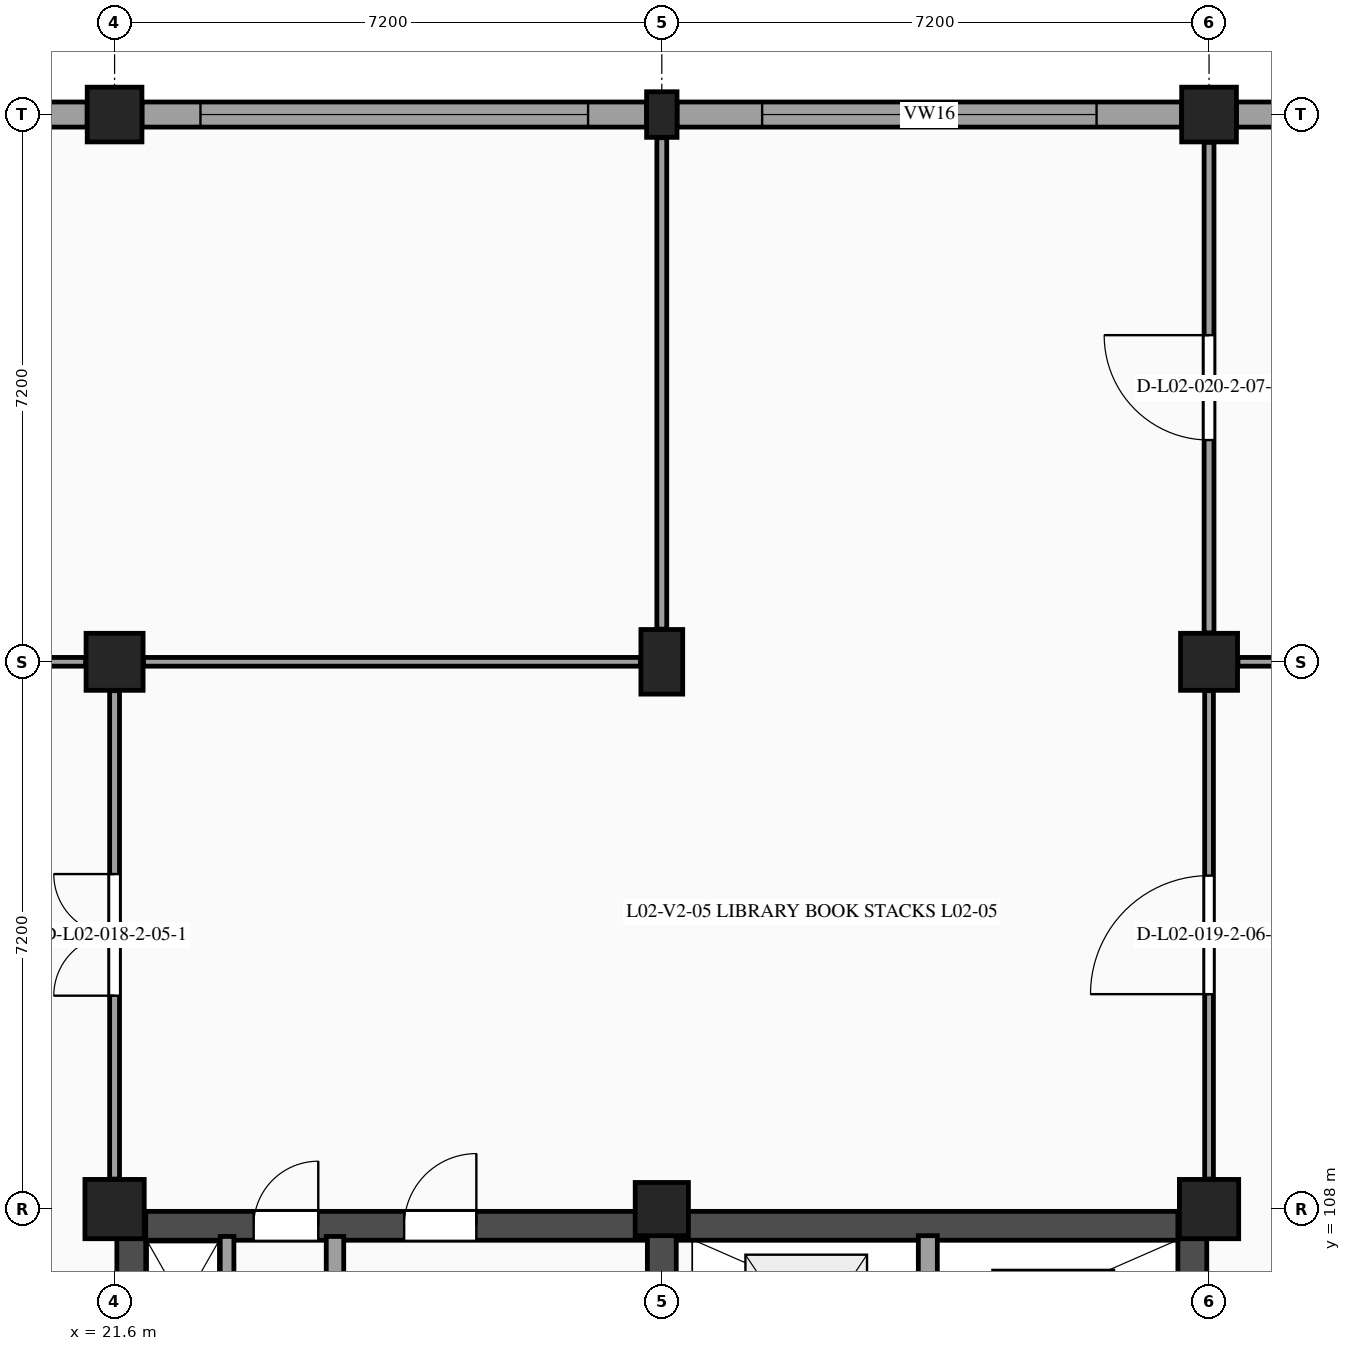
"""IFC4 building model, lengths in metres.
Left out: names, types, materials, properties, quantities, classifications, styles, units other than length and angle.
Written with IfcOpenShell. Run it as: python <this file> out.ifc"""

import sys

from ifc_helpers import new_model, si_unit, direction, frame, frame_2d, origin, origin_2d, place, context, subcontext, project, spatial, rectangle, extrude, element, fill, save


model = new_model("IFC4")
c1 = context("Model", 3, precision=1e-05, world=origin(), true_north=direction((0.0, 1.0)))
c2 = subcontext(c1, "Body", "Model", "MODEL_VIEW")
j1 = project(units=[si_unit("LENGTHUNIT", "METRE"), si_unit("PLANEANGLEUNIT", "RADIAN")], contexts=[c1])
p1 = place(None, origin())
s1 = spatial("IfcSite", under=j1, at=p1, CompositionType="ELEMENT")
p2 = place(p1, origin())
s2 = spatial("IfcBuilding", under=s1, at=p2, CompositionType="ELEMENT")
p3 = place(p2, frame((0.0, 0.0, 9.9)))
s3 = spatial("IfcBuildingStorey", under=s2, at=p3, CompositionType="ELEMENT", Elevation=9.9)
p4 = place(p3, frame((21.6, 108.0, 0.0), z_axis=(0.0, 0.0, 1.0), x_axis=(1.0, 0.0, 0.0)))
e1 = element("IfcColumn", 1, at=p4, inside=s3, PredefinedType="COLUMN", context=c2, shape_type="SweptSolid", body=[
    extrude(rectangle(XDim=0.78, YDim=0.78, at=origin_2d()), origin(), (0.0, 0.0, 1.0), 4.5),
])
p5 = place(p3, frame((21.6, 115.2, 0.0), z_axis=(0.0, 0.0, 1.0), x_axis=(1.0, 0.0, 0.0)))
e2 = element("IfcColumn", 2, at=p5, inside=s3, PredefinedType="COLUMN", context=c2, shape_type="SweptSolid", body=[
    extrude(rectangle(XDim=0.75, YDim=0.75, at=origin_2d()), origin(), (0.0, 0.0, 1.0), 4.5),
])
p6 = place(p3, frame((21.6, 122.4, 0.0), z_axis=(0.0, 0.0, 1.0), x_axis=(1.0, 0.0, 0.0)))
e3 = element("IfcColumn", 3, at=p6, inside=s3, PredefinedType="COLUMN", context=c2, shape_type="SweptSolid", body=[
    extrude(rectangle(XDim=0.72, YDim=0.72, at=origin_2d()), origin(), (0.0, 0.0, 1.0), 4.5),
])
p7 = place(p3, frame((28.8, 108.0, 0.0), z_axis=(0.0, 0.0, 1.0), x_axis=(1.0, 0.0, 0.0)))
e4 = element("IfcColumn", 4, at=p7, inside=s3, PredefinedType="COLUMN", context=c2, shape_type="SweptSolid", body=[
    extrude(rectangle(XDim=0.7, YDim=0.7, at=origin_2d()), origin(), (0.0, 0.0, 1.0), 4.5),
])
p8 = place(p3, frame((28.8, 115.2, 0.0), z_axis=(0.0, 0.0, 1.0), x_axis=(1.0, 0.0, 0.0)))
e5 = element("IfcColumn", 5, at=p8, inside=s3, PredefinedType="COLUMN", context=c2, shape_type="SweptSolid", body=[
    extrude(rectangle(XDim=0.55, YDim=0.85, at=origin_2d()), origin(), (0.0, 0.0, 1.0), 4.5),
])
p9 = place(p3, frame((28.8, 122.4, 0.0), z_axis=(0.0, 0.0, 1.0), x_axis=(1.0, 0.0, 0.0)))
e6 = element("IfcColumn", 6, at=p9, inside=s3, PredefinedType="PILASTER", context=c2, shape_type="SweptSolid", body=[
    extrude(rectangle(XDim=0.4, YDim=0.6, at=origin_2d()), origin(), (0.0, 0.0, 1.0), 4.5),
])
p10 = place(p3, frame((36.0, 108.0, 0.0), z_axis=(0.0, 0.0, 1.0), x_axis=(1.0, 0.0, 0.0)))
e7 = element("IfcColumn", 7, at=p10, inside=s3, PredefinedType="COLUMN", context=c2, shape_type="SweptSolid", body=[
    extrude(rectangle(XDim=0.78, YDim=0.78, at=origin_2d()), origin(), (0.0, 0.0, 1.0), 4.5),
])
p11 = place(p3, frame((36.0, 115.2, 0.0), z_axis=(0.0, 0.0, 1.0), x_axis=(1.0, 0.0, 0.0)))
e8 = element("IfcColumn", 8, at=p11, inside=s3, PredefinedType="COLUMN", context=c2, shape_type="SweptSolid", body=[
    extrude(rectangle(XDim=0.75, YDim=0.75, at=origin_2d()), origin(), (0.0, 0.0, 1.0), 4.5),
])
p12 = place(p3, frame((36.0, 122.4, 0.0), z_axis=(0.0, 0.0, 1.0), x_axis=(1.0, 0.0, 0.0)))
e9 = element("IfcColumn", 9, at=p12, inside=s3, PredefinedType="COLUMN", context=c2, shape_type="SweptSolid", body=[
    extrude(rectangle(XDim=0.72, YDim=0.72, at=origin_2d()), origin(), (0.0, 0.0, 1.0), 4.5),
])
p13 = place(p3, frame((14.6, 122.4, 0.0), z_axis=(0.0, 0.0, 1.0), x_axis=(1.0, 0.0, 0.0)))
e10 = element("IfcWall", 10, at=p13, inside=s3, PredefinedType="STANDARD", context=c2, shape_type="SweptSolid", body=[
    extrude(rectangle(XDim=6.64, YDim=0.33, at=frame_2d((3.32, 0.0))), origin(), (0.0, 0.0, 1.0), 3.47),
])
p14 = place(p13, frame((2.22, 0.0, 0.98)))
e11 = element("IfcOpeningElement", 11, at=p14, cuts=e10, PredefinedType="OPENING", context=c2, shape_type="SweptSolid", body=[
    extrude(rectangle(XDim=2.2, YDim=1.45, at=frame_2d((1.1, 0.725))), frame((0.0, 0.175, 0.0), z_axis=(0.0, -1.0, 0.0), x_axis=(1.0, 0.0, 0.0)), (0.0, 0.0, 1.0), 0.35),
])
p15 = place(p3, frame((21.96, 122.4, 0.0), z_axis=(0.0, 0.0, 1.0), x_axis=(1.0, 0.0, 0.0)))
e12 = element("IfcWall", 12, at=p15, inside=s3, PredefinedType="STANDARD", context=c2, shape_type="SweptSolid", body=[
    extrude(rectangle(XDim=6.64, YDim=0.33, at=frame_2d((3.32, 0.0))), origin(), (0.0, 0.0, 1.0), 3.47),
])
p16 = place(p15, frame((0.77, 0.0, 0.98)))
e13 = element("IfcOpeningElement", 13, at=p16, cuts=e12, PredefinedType="OPENING", context=c2, shape_type="SweptSolid", body=[
    extrude(rectangle(XDim=5.1, YDim=1.75, at=frame_2d((2.55, 0.875))), frame((0.0, 0.175, 0.0), z_axis=(0.0, -1.0, 0.0), x_axis=(1.0, 0.0, 0.0)), (0.0, 0.0, 1.0), 0.35),
])
p17 = place(p3, frame((29.0, 122.4, 0.0), z_axis=(0.0, 0.0, 1.0), x_axis=(1.0, 0.0, 0.0)))
e14 = element("IfcWall", 14, at=p17, inside=s3, PredefinedType="STANDARD", context=c2, shape_type="SweptSolid", body=[
    extrude(rectangle(XDim=6.64, YDim=0.33, at=frame_2d((3.32, 0.0))), origin(), (0.0, 0.0, 1.0), 3.47),
])
p18 = place(p17, frame((1.12, 0.0, 0.98)))
e15 = element("IfcOpeningElement", 15, at=p18, cuts=e14, PredefinedType="OPENING", context=c2, shape_type="SweptSolid", body=[
    extrude(rectangle(XDim=4.4, YDim=1.65, at=frame_2d((2.2, 0.825))), frame((0.0, 0.175, 0.0), z_axis=(0.0, -1.0, 0.0), x_axis=(1.0, 0.0, 0.0)), (0.0, 0.0, 1.0), 0.35),
])
p19 = place(p3, frame((36.36, 122.4, 0.0), z_axis=(0.0, 0.0, 1.0), x_axis=(1.0, 0.0, 0.0)))
e16 = element("IfcWall", 16, at=p19, inside=s3, PredefinedType="STANDARD", context=c2, shape_type="SweptSolid", body=[
    extrude(rectangle(XDim=6.64, YDim=0.33, at=frame_2d((3.32, 0.0))), origin(), (0.0, 0.0, 1.0), 3.47),
])
p20 = place(p19, frame((1.42, 0.0, 0.98)))
e17 = element("IfcOpeningElement", 17, at=p20, cuts=e16, PredefinedType="OPENING", context=c2, shape_type="SweptSolid", body=[
    extrude(rectangle(XDim=3.8, YDim=1.6, at=frame_2d((1.9, 0.8))), frame((0.0, 0.175, 0.0), z_axis=(0.0, -1.0, 0.0), x_axis=(1.0, 0.0, 0.0)), (0.0, 0.0, 1.0), 0.35),
])
p21 = place(p3, frame((21.82, 107.97, 0.0), z_axis=(0.0, 0.0, 1.0), x_axis=(0.0, -1.0, 0.0)))
e18 = element("IfcWall", 18, at=p21, inside=s3, PredefinedType="SHEAR", context=c2, shape_type="SweptSolid", body=[
    extrude(rectangle(XDim=7.14, YDim=0.38, at=frame_2d((3.57, 0.0))), origin(), (0.0, 0.0, 1.0), 4.225),
])
p22 = place(p3, frame((22.01, 107.78, 0.0), z_axis=(0.0, 0.0, 1.0), x_axis=(1.0, 0.0, 0.0)))
e19 = element("IfcWall", 19, at=p22, inside=s3, PredefinedType="SHEAR", context=c2, shape_type="SweptSolid", body=[
    extrude(rectangle(XDim=6.6, YDim=0.38, at=frame_2d((3.3, 0.0))), origin(), (0.0, 0.0, 1.0), 4.225),
])
p23 = place(p22, frame((1.42, 0.0, 0.0)))
e20 = element("IfcOpeningElement", 20, at=p23, cuts=e19, PredefinedType="OPENING", context=c2, shape_type="SweptSolid", body=[
    extrude(rectangle(XDim=0.85, YDim=2.1, at=frame_2d((0.425, 1.05))), frame((0.0, 0.2, 0.0), z_axis=(0.0, -1.0, 0.0), x_axis=(1.0, 0.0, 0.0)), (0.0, 0.0, 1.0), 0.4),
])
p24 = place(p22, frame((3.4, 0.0, 0.0)))
e21 = element("IfcOpeningElement", 21, at=p24, cuts=e19, PredefinedType="OPENING", context=c2, shape_type="SweptSolid", body=[
    extrude(rectangle(XDim=0.95, YDim=2.15, at=frame_2d((0.475, 1.075))), frame((0.0, 0.2, 0.0), z_axis=(0.0, -1.0, 0.0), x_axis=(1.0, 0.0, 0.0)), (0.0, 0.0, 1.0), 0.4),
])
p25 = place(p3, frame((24.5, 105.9, 0.0), z_axis=(0.0, 0.0, 1.0), x_axis=(0.0, 1.0, 0.0)))
e22 = element("IfcWall", 22, at=p25, inside=s3, PredefinedType="PARTITIONING", context=c2, shape_type="SweptSolid", body=[
    extrude(rectangle(XDim=1.74, YDim=0.23, at=frame_2d((0.87, 0.0))), origin(), (0.0, 0.0, 1.0), 4.225),
])
p26 = place(p3, frame((23.08, 105.88, 0.0), z_axis=(0.0, 0.0, 1.0), x_axis=(0.0, 1.0, 0.0)))
e23 = element("IfcWall", 23, at=p26, inside=s3, PredefinedType="PARTITIONING", context=c2, shape_type="SweptSolid", body=[
    extrude(rectangle(XDim=1.76, YDim=0.18, at=frame_2d((0.88, 0.0))), origin(), (0.0, 0.0, 1.0), 4.225),
])
p27 = place(p3, frame((28.8, 100.83, 0.0), z_axis=(0.0, 0.0, 1.0), x_axis=(0.0, 1.0, 0.0)))
e24 = element("IfcWall", 24, at=p27, inside=s3, PredefinedType="SHEAR", context=c2, shape_type="SweptSolid", body=[
    extrude(rectangle(XDim=7.14, YDim=0.38, at=frame_2d((3.57, 0.0))), origin(), (0.0, 0.0, 1.0), 4.225),
])
p28 = place(p27, frame((1.4, 0.0, 0.0)))
e25 = element("IfcOpeningElement", 25, at=p28, cuts=e24, PredefinedType="OPENING", context=c2, shape_type="SweptSolid", body=[
    extrude(rectangle(XDim=1.8, YDim=2.2, at=frame_2d((0.9, 1.1))), frame((0.0, 0.2, 0.0), z_axis=(0.0, -1.0, 0.0), x_axis=(1.0, 0.0, 0.0)), (0.0, 0.0, 1.0), 0.4),
])
p29 = place(p3, frame((35.78, 100.83, 0.0), z_axis=(0.0, 0.0, 1.0), x_axis=(0.0, 1.0, 0.0)))
e26 = element("IfcWall", 26, at=p29, inside=s3, PredefinedType="SHEAR", context=c2, shape_type="SweptSolid", body=[
    extrude(rectangle(XDim=7.14, YDim=0.38, at=frame_2d((3.57, 0.0))), origin(), (0.0, 0.0, 1.0), 4.225),
])
p30 = place(p3, frame((28.99, 107.78, 0.0), z_axis=(0.0, 0.0, 1.0), x_axis=(1.0, 0.0, 0.0)))
e27 = element("IfcWall", 27, at=p30, inside=s3, PredefinedType="SHEAR", context=c2, shape_type="SweptSolid", body=[
    extrude(rectangle(XDim=6.6, YDim=0.38, at=frame_2d((3.3, 0.0))), origin(), (0.0, 0.0, 1.0), 4.225),
])
p31 = place(p3, frame((32.3, 104.78, 0.0), z_axis=(0.0, 0.0, 1.0), x_axis=(0.0, 1.0, 0.0)))
e28 = element("IfcWall", 28, at=p31, inside=s3, PredefinedType="PARTITIONING", context=c2, shape_type="SweptSolid", body=[
    extrude(rectangle(XDim=2.87, YDim=0.25, at=frame_2d((1.435, 0.0))), origin(), (0.0, 0.0, 1.0), 4.225),
])
p32 = place(p3, frame((21.6, 108.395, 0.0), z_axis=(0.0, 0.0, 1.0), x_axis=(0.0, 1.0, 0.0)))
e29 = element("IfcWall", 29, at=p32, inside=s3, PredefinedType="PARTITIONING", context=c2, shape_type="SweptSolid", body=[
    extrude(rectangle(XDim=6.425, YDim=0.13, at=frame_2d((3.212, 0.0))), origin(), (0.0, 0.0, 1.0), 3.535),
])
p33 = place(p32, frame((2.413, 0.0, 0.0)))
e30 = element("IfcOpeningElement", 30, at=p33, cuts=e29, PredefinedType="OPENING", context=c2, shape_type="SweptSolid", body=[
    extrude(rectangle(XDim=1.6, YDim=2.2, at=frame_2d((0.8, 1.1))), frame((0.0, 0.075, 0.0), z_axis=(0.0, -1.0, 0.0), x_axis=(1.0, 0.0, 0.0)), (0.0, 0.0, 1.0), 0.15),
])
p34 = place(p3, frame((14.68, 115.2, 0.0), z_axis=(0.0, 0.0, 1.0), x_axis=(1.0, 0.0, 0.0)))
e31 = element("IfcWall", 31, at=p34, inside=s3, PredefinedType="PARTITIONING", context=c2, shape_type="SweptSolid", body=[
    extrude(rectangle(XDim=6.54, YDim=0.115, at=frame_2d((3.27, 0.0))), origin(), (0.0, 0.0, 1.0), 3.505),
])
p35 = place(p3, frame((21.98, 115.2, 0.0), z_axis=(0.0, 0.0, 1.0), x_axis=(1.0, 0.0, 0.0)))
e32 = element("IfcWall", 32, at=p35, inside=s3, PredefinedType="PARTITIONING", context=c2, shape_type="SweptSolid", body=[
    extrude(rectangle(XDim=6.54, YDim=0.115, at=frame_2d((3.27, 0.0))), origin(), (0.0, 0.0, 1.0), 3.525),
])
p36 = place(p3, frame((28.8, 115.63, 0.0), z_axis=(0.0, 0.0, 1.0), x_axis=(0.0, 1.0, 0.0)))
e33 = element("IfcWall", 33, at=p36, inside=s3, PredefinedType="PARTITIONING", context=c2, shape_type="SweptSolid", body=[
    extrude(rectangle(XDim=6.465, YDim=0.13, at=frame_2d((3.232, 0.0))), origin(), (0.0, 0.0, 1.0), 3.53),
])
p37 = place(p3, frame((36.0, 108.395, 0.0), z_axis=(0.0, 0.0, 1.0), x_axis=(0.0, 1.0, 0.0)))
e34 = element("IfcWall", 34, at=p37, inside=s3, PredefinedType="PARTITIONING", context=c2, shape_type="SweptSolid", body=[
    extrude(rectangle(XDim=6.425, YDim=0.115, at=frame_2d((3.212, 0.0))), origin(), (0.0, 0.0, 1.0), 3.535),
])
p38 = place(p37, frame((2.433, 0.0, 0.0)))
e35 = element("IfcOpeningElement", 35, at=p38, cuts=e34, PredefinedType="OPENING", context=c2, shape_type="SweptSolid", body=[
    extrude(rectangle(XDim=1.56, YDim=2.25, at=frame_2d((0.78, 1.125))), frame((0.0, 0.067, 0.0), z_axis=(0.0, -1.0, 0.0), x_axis=(1.0, 0.0, 0.0)), (0.0, 0.0, 1.0), 0.135),
])
p39 = place(p3, frame((36.0, 115.58, 0.0), z_axis=(0.0, 0.0, 1.0), x_axis=(0.0, 1.0, 0.0)))
e36 = element("IfcWall", 36, at=p39, inside=s3, PredefinedType="PARTITIONING", context=c2, shape_type="SweptSolid", body=[
    extrude(rectangle(XDim=6.455, YDim=0.13, at=frame_2d((3.228, 0.0))), origin(), (0.0, 0.0, 1.0), 3.53),
])
p40 = place(p39, frame((2.538, 0.0, 0.0)))
e37 = element("IfcOpeningElement", 37, at=p40, cuts=e36, PredefinedType="OPENING", context=c2, shape_type="SweptSolid", body=[
    extrude(rectangle(XDim=1.38, YDim=2.22, at=frame_2d((0.69, 1.11))), frame((0.0, 0.075, 0.0), z_axis=(0.0, -1.0, 0.0), x_axis=(1.0, 0.0, 0.0)), (0.0, 0.0, 1.0), 0.15),
])
p41 = place(p3, frame((36.38, 115.2, 0.0), z_axis=(0.0, 0.0, 1.0), x_axis=(1.0, 0.0, 0.0)))
e38 = element("IfcWall", 38, at=p41, inside=s3, PredefinedType="PARTITIONING", context=c2, shape_type="SweptSolid", body=[
    extrude(rectangle(XDim=6.54, YDim=0.115, at=frame_2d((3.27, 0.0))), origin(), (0.0, 0.0, 1.0), 3.575),
])
p42 = place(p16, origin())
e39 = element("IfcWindow", 39, at=p42, inside=s3, PartitioningType="SINGLE_PANEL", PredefinedType="WINDOW", context=c2, shape_type="SweptSolid", body=[
    extrude(rectangle(XDim=5.1, YDim=1.75, at=frame_2d((2.55, 0.875))), frame((0.0, -0.03, 0.0), z_axis=(0.0, -1.0, 0.0), x_axis=(1.0, 0.0, 0.0)), (0.0, 0.0, 1.0), 0.06),
])
fill(e13, e39)
p43 = place(p18, origin())
e40 = element("IfcWindow", 40, at=p43, inside=s3, PartitioningType="SINGLE_PANEL", PredefinedType="WINDOW", context=c2, shape_type="SweptSolid", body=[
    extrude(rectangle(XDim=4.4, YDim=1.65, at=frame_2d((2.2, 0.825))), frame((0.0, -0.03, 0.0), z_axis=(0.0, -1.0, 0.0), x_axis=(1.0, 0.0, 0.0)), (0.0, 0.0, 1.0), 0.06),
])
fill(e15, e40)
p44 = place(p23, origin())
e41 = element("IfcDoor", 41, at=p44, inside=s3, OperationType="SINGLE_SWING_RIGHT", PredefinedType="DOOR", context=c2, shape_type="SweptSolid", body=[
    extrude(rectangle(XDim=0.85, YDim=2.1, at=frame_2d((0.425, 1.05))), frame((0.0, 0.025, 0.0), z_axis=(0.0, -1.0, 0.0), x_axis=(1.0, 0.0, 0.0)), (0.0, 0.0, 1.0), 0.05),
])
fill(e20, e41)
p45 = place(p24, origin())
e42 = element("IfcDoor", 42, at=p45, inside=s3, OperationType="SINGLE_SWING_RIGHT", PredefinedType="DOOR", context=c2, shape_type="SweptSolid", body=[
    extrude(rectangle(XDim=0.95, YDim=2.15, at=frame_2d((0.475, 1.075))), frame((0.0, 0.025, 0.0), z_axis=(0.0, -1.0, 0.0), x_axis=(1.0, 0.0, 0.0)), (0.0, 0.0, 1.0), 0.05),
])
fill(e21, e42)
p46 = place(p33, origin())
e43 = element("IfcDoor", 43, at=p46, inside=s3, OperationType="DOUBLE_DOOR_SINGLE_SWING", PredefinedType="DOOR", context=c2, shape_type="SweptSolid", body=[
    extrude(rectangle(XDim=1.6, YDim=2.2, at=frame_2d((0.8, 1.1))), frame((0.0, 0.025, 0.0), z_axis=(0.0, -1.0, 0.0), x_axis=(1.0, 0.0, 0.0)), (0.0, 0.0, 1.0), 0.05),
])
fill(e30, e43)
p47 = place(p38, origin())
e44 = element("IfcDoor", 44, at=p47, inside=s3, OperationType="SINGLE_SWING_LEFT", PredefinedType="DOOR", context=c2, shape_type="SweptSolid", body=[
    extrude(rectangle(XDim=1.56, YDim=2.25, at=frame_2d((0.78, 1.125))), frame((0.0, 0.025, 0.0), z_axis=(0.0, -1.0, 0.0), x_axis=(1.0, 0.0, 0.0)), (0.0, 0.0, 1.0), 0.05),
])
fill(e35, e44)
p48 = place(p40, origin())
e45 = element("IfcDoor", 45, at=p48, inside=s3, OperationType="SINGLE_SWING_RIGHT", PredefinedType="DOOR", context=c2, shape_type="SweptSolid", body=[
    extrude(rectangle(XDim=1.38, YDim=2.22, at=frame_2d((0.69, 1.11))), frame((0.0, 0.025, 0.0), z_axis=(0.0, -1.0, 0.0), x_axis=(1.0, 0.0, 0.0)), (0.0, 0.0, 1.0), 0.05),
])
fill(e37, e45)
save(model, sys.argv[1])
